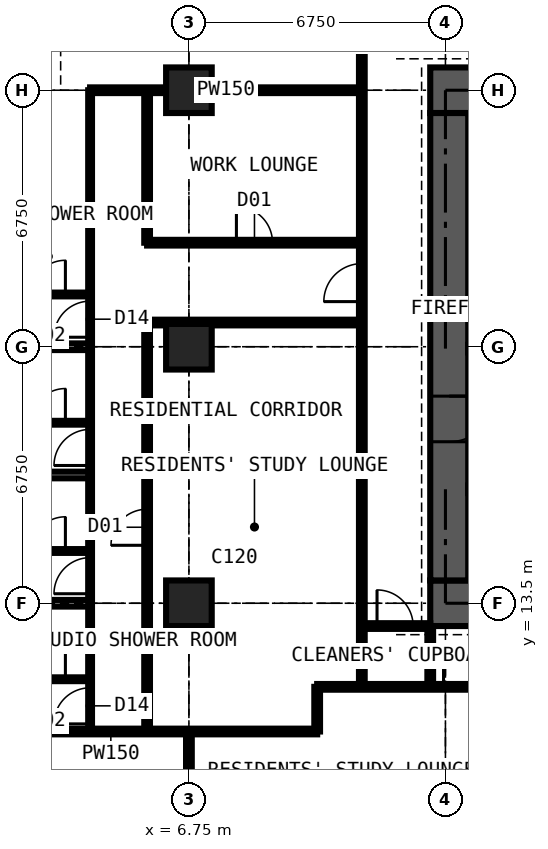
"""IFC4 building model, lengths in metres.
Left out: names, types, materials, properties, quantities, classifications, styles, units other than length and angle.
Written with IfcOpenShell. Run it as: python <this file> out.ifc"""

import sys

from ifc_helpers import new_model, si_unit, direction, frame, frame_2d, origin, origin_2d, place, context, subcontext, project, spatial, rectangle, extrude, element, fill, save


model = new_model("IFC4")
c1 = context("Model", 3, precision=1e-05, world=origin(), true_north=direction((0.0, 1.0)))
c2 = subcontext(c1, "Body", "Model", "MODEL_VIEW")
j1 = project(units=[si_unit("LENGTHUNIT", "METRE"), si_unit("PLANEANGLEUNIT", "RADIAN")], contexts=[c1])
p1 = place(None, origin())
s1 = spatial("IfcSite", under=j1, at=p1, CompositionType="ELEMENT")
p2 = place(p1, origin())
s2 = spatial("IfcBuilding", under=s1, at=p2, CompositionType="ELEMENT")
p3 = place(p2, frame((0.0, 0.0, 185.4)))
s3 = spatial("IfcBuildingStorey", under=s2, at=p3, CompositionType="ELEMENT", Elevation=185.4)
for number, where, z_axis, x_axis in (
    (1, (6.75, 13.5, 0.0), (0.0, 0.0, 1.0), (1.0, 0.0, 0.0)),
    (2, (6.75, 20.25, 0.0), (0.0, 0.0, 1.0), (1.0, 0.0, 0.0)),
    (3, (6.75, 27.0, 0.0), (0.0, 0.0, 1.0), (1.0, 0.0, 0.0)),
):
    element("IfcColumn", number, at=place(p3, frame(where, z_axis=z_axis, x_axis=x_axis)), inside=s3, PredefinedType="COLUMN", context=c2, shape_type="SweptSolid", body=[
        extrude(rectangle(XDim=1.2, YDim=1.2, at=origin_2d()), origin(), (0.0, 0.0, 1.0), 3.6),
    ])
p4 = place(p3, frame((13.1, 13.5, 0.0), z_axis=(0.0, 0.0, 1.0), x_axis=(1.0, 0.0, 0.0)))
e4 = element("IfcWall", 4, at=p4, inside=s3, PredefinedType="SHEAR", context=c2, shape_type="SweptSolid", body=[
    extrude(rectangle(XDim=14.3, YDim=1.2, at=frame_2d((7.15, 0.0))), origin(), (0.0, 0.0, 1.0), 3.6),
])
p5 = place(p3, frame((27.4, 27.0, 0.0), z_axis=(0.0, 0.0, 1.0), x_axis=(-1.0, 0.0, 0.0)))
e5 = element("IfcWall", 5, at=p5, inside=s3, PredefinedType="SHEAR", context=c2, shape_type="SweptSolid", body=[
    extrude(rectangle(XDim=14.3, YDim=1.2, at=frame_2d((7.15, 0.0))), origin(), (0.0, 0.0, 1.0), 3.6),
])
p6 = place(p5, frame((4.55, 0.0, 0.0)))
e6 = element("IfcOpeningElement", 6, at=p6, cuts=e5, PredefinedType="OPENING", context=c2, shape_type="SweptSolid", body=[
    extrude(rectangle(XDim=0.9, YDim=2.2, at=frame_2d((0.45, 1.1))), frame((0.0, 0.61, 0.0), z_axis=(0.0, -1.0, 0.0), x_axis=(1.0, 0.0, 0.0)), (0.0, 0.0, 1.0), 1.22),
])
p7 = place(p5, frame((7.525, 0.0, 0.0)))
e7 = element("IfcOpeningElement", 7, at=p7, cuts=e5, PredefinedType="OPENING", context=c2, shape_type="SweptSolid", body=[
    extrude(rectangle(XDim=1.0, YDim=2.2, at=frame_2d((0.5, 1.1))), frame((0.0, 0.61, 0.0), z_axis=(0.0, -1.0, 0.0), x_axis=(1.0, 0.0, 0.0)), (0.0, 0.0, 1.0), 1.22),
])
p8 = place(p3, frame((13.6, 26.4, 0.0), z_axis=(0.0, 0.0, 1.0), x_axis=(0.0, -1.0, 0.0)))
e8 = element("IfcWall", 8, at=p8, inside=s3, PredefinedType="SHEAR", context=c2, shape_type="SweptSolid", body=[
    extrude(rectangle(XDim=12.3, YDim=1.0, at=frame_2d((6.15, 0.0))), origin(), (0.0, 0.0, 1.0), 3.6),
])
p9 = place(p8, frame((7.45, 0.0, 0.0)))
e9 = element("IfcOpeningElement", 9, at=p9, cuts=e8, PredefinedType="OPENING", context=c2, shape_type="SweptSolid", body=[
    extrude(rectangle(XDim=1.2, YDim=2.2, at=frame_2d((0.6, 1.1))), frame((0.0, 0.51, 0.0), z_axis=(0.0, -1.0, 0.0), x_axis=(1.0, 0.0, 0.0)), (0.0, 0.0, 1.0), 1.02),
])
p10 = place(p3, frame((-0.734, 10.125, 0.0), z_axis=(0.0, 0.0, 1.0), x_axis=(1.0, 0.0, 0.0)))
e10 = element("IfcWall", 10, at=p10, inside=s3, PredefinedType="PARTITIONING", context=c2, shape_type="SweptSolid", body=[
    extrude(rectangle(XDim=10.859, YDim=0.15, at=frame_2d((5.429, 0.0))), origin(), (0.0, 0.0, 1.0), 3.375),
])
p11 = place(p3, frame((-0.734, 13.5, 0.0), z_axis=(0.0, 0.0, 1.0), x_axis=(1.0, 0.0, 0.0)))
e11 = element("IfcWall", 11, at=p11, inside=s3, PredefinedType="PARTITIONING", context=c2, shape_type="SweptSolid", body=[
    extrude(rectangle(XDim=4.884, YDim=0.175, at=frame_2d((2.442, 0.0))), origin(), (0.0, 0.0, 1.0), 2.877),
])
p12 = place(p3, frame((-0.734, 16.875, 0.0), z_axis=(0.0, 0.0, 1.0), x_axis=(1.0, 0.0, 0.0)))
e12 = element("IfcWall", 12, at=p12, inside=s3, PredefinedType="PARTITIONING", context=c2, shape_type="SweptSolid", body=[
    extrude(rectangle(XDim=4.884, YDim=0.175, at=frame_2d((2.442, 0.0))), origin(), (0.0, 0.0, 1.0), 3.375),
])
p13 = place(p3, frame((-0.734, 20.25, 0.0), z_axis=(0.0, 0.0, 1.0), x_axis=(1.0, 0.0, 0.0)))
e13 = element("IfcWall", 13, at=p13, inside=s3, PredefinedType="PARTITIONING", context=c2, shape_type="SweptSolid", body=[
    extrude(rectangle(XDim=4.884, YDim=0.175, at=frame_2d((2.442, 0.0))), origin(), (0.0, 0.0, 1.0), 2.877),
])
p14 = place(p3, frame((-0.734, 23.625, 0.0), z_axis=(0.0, 0.0, 1.0), x_axis=(1.0, 0.0, 0.0)))
e14 = element("IfcWall", 14, at=p14, inside=s3, PredefinedType="PARTITIONING", context=c2, shape_type="SweptSolid", body=[
    extrude(rectangle(XDim=4.884, YDim=0.15, at=frame_2d((2.442, 0.0))), origin(), (0.0, 0.0, 1.0), 3.375),
])
p15 = place(p3, frame((1.95, 11.5, 0.0), z_axis=(0.0, 0.0, 1.0), x_axis=(1.0, 0.0, 0.0)))
e15 = element("IfcWall", 15, at=p15, inside=s3, PredefinedType="PARTITIONING", context=c2, shape_type="SweptSolid", body=[
    extrude(rectangle(XDim=2.2, YDim=0.1, at=frame_2d((1.1, 0.0))), origin(), (0.0, 0.0, 1.0), 3.375),
])
p16 = place(p15, frame((0.65, 0.0, 0.0)))
e16 = element("IfcOpeningElement", 16, at=p16, cuts=e15, PredefinedType="OPENING", context=c2, shape_type="SweptSolid", body=[
    extrude(rectangle(XDim=0.9, YDim=2.2, at=frame_2d((0.45, 1.1))), frame((0.0, 0.06, 0.0), z_axis=(0.0, -1.0, 0.0), x_axis=(1.0, 0.0, 0.0)), (0.0, 0.0, 1.0), 0.12),
])
p17 = place(p3, frame((1.95, 14.875, 0.0), z_axis=(0.0, 0.0, 1.0), x_axis=(1.0, 0.0, 0.0)))
e17 = element("IfcWall", 17, at=p17, inside=s3, PredefinedType="PARTITIONING", context=c2, shape_type="SweptSolid", body=[
    extrude(rectangle(XDim=2.2, YDim=0.1, at=frame_2d((1.1, 0.0))), origin(), (0.0, 0.0, 1.0), 3.375),
])
p18 = place(p17, frame((0.65, 0.0, 0.0)))
e18 = element("IfcOpeningElement", 18, at=p18, cuts=e17, PredefinedType="OPENING", context=c2, shape_type="SweptSolid", body=[
    extrude(rectangle(XDim=0.9, YDim=2.2, at=frame_2d((0.45, 1.1))), frame((0.0, 0.06, 0.0), z_axis=(0.0, -1.0, 0.0), x_axis=(1.0, 0.0, 0.0)), (0.0, 0.0, 1.0), 0.12),
])
p19 = place(p3, frame((1.95, 18.25, 0.0), z_axis=(0.0, 0.0, 1.0), x_axis=(1.0, 0.0, 0.0)))
e19 = element("IfcWall", 19, at=p19, inside=s3, PredefinedType="PARTITIONING", context=c2, shape_type="SweptSolid", body=[
    extrude(rectangle(XDim=2.2, YDim=0.1, at=frame_2d((1.1, 0.0))), origin(), (0.0, 0.0, 1.0), 3.375),
])
p20 = place(p19, frame((0.65, 0.0, 0.0)))
e20 = element("IfcOpeningElement", 20, at=p20, cuts=e19, PredefinedType="OPENING", context=c2, shape_type="SweptSolid", body=[
    extrude(rectangle(XDim=0.9, YDim=2.2, at=frame_2d((0.45, 1.1))), frame((0.0, 0.06, 0.0), z_axis=(0.0, -1.0, 0.0), x_axis=(1.0, 0.0, 0.0)), (0.0, 0.0, 1.0), 0.12),
])
p21 = place(p3, frame((1.95, 21.625, 0.0), z_axis=(0.0, 0.0, 1.0), x_axis=(1.0, 0.0, 0.0)))
e21 = element("IfcWall", 21, at=p21, inside=s3, PredefinedType="PARTITIONING", context=c2, shape_type="SweptSolid", body=[
    extrude(rectangle(XDim=2.2, YDim=0.1, at=frame_2d((1.1, 0.0))), origin(), (0.0, 0.0, 1.0), 3.375),
])
p22 = place(p21, frame((0.65, 0.0, 0.0)))
e22 = element("IfcOpeningElement", 22, at=p22, cuts=e21, PredefinedType="OPENING", context=c2, shape_type="SweptSolid", body=[
    extrude(rectangle(XDim=0.9, YDim=2.2, at=frame_2d((0.45, 1.1))), frame((0.0, 0.06, 0.0), z_axis=(0.0, -1.0, 0.0), x_axis=(1.0, 0.0, 0.0)), (0.0, 0.0, 1.0), 0.12),
])
p23 = place(p3, frame((4.15, 10.125, 0.0), z_axis=(0.0, 0.0, 1.0), x_axis=(0.0, 1.0, 0.0)))
e23 = element("IfcWall", 23, at=p23, inside=s3, PredefinedType="PARTITIONING", context=c2, shape_type="SweptSolid", body=[
    extrude(rectangle(XDim=16.875, YDim=0.1, at=frame_2d((8.438, 0.0))), origin(), (0.0, 0.0, 1.0), 3.375),
])
p24 = place(p23, frame((0.2, 0.0, 0.0)))
e24 = element("IfcOpeningElement", 24, at=p24, cuts=e23, PredefinedType="OPENING", context=c2, shape_type="SweptSolid", body=[
    extrude(rectangle(XDim=0.95, YDim=2.2, at=frame_2d((0.475, 1.1))), frame((0.0, 0.06, 0.0), z_axis=(0.0, -1.0, 0.0), x_axis=(1.0, 0.0, 0.0)), (0.0, 0.0, 1.0), 0.12),
])
p25 = place(p23, frame((3.625, 0.0, 0.0)))
e25 = element("IfcOpeningElement", 25, at=p25, cuts=e23, PredefinedType="OPENING", context=c2, shape_type="SweptSolid", body=[
    extrude(rectangle(XDim=0.95, YDim=2.2, at=frame_2d((0.475, 1.1))), frame((0.0, 0.06, 0.0), z_axis=(0.0, -1.0, 0.0), x_axis=(1.0, 0.0, 0.0)), (0.0, 0.0, 1.0), 0.12),
])
p26 = place(p23, frame((7.0, 0.0, 0.0)))
e26 = element("IfcOpeningElement", 26, at=p26, cuts=e23, PredefinedType="OPENING", context=c2, shape_type="SweptSolid", body=[
    extrude(rectangle(XDim=0.95, YDim=2.2, at=frame_2d((0.475, 1.1))), frame((0.0, 0.06, 0.0), z_axis=(0.0, -1.0, 0.0), x_axis=(1.0, 0.0, 0.0)), (0.0, 0.0, 1.0), 0.12),
])
p27 = place(p23, frame((10.375, 0.0, 0.0)))
e27 = element("IfcOpeningElement", 27, at=p27, cuts=e23, PredefinedType="OPENING", context=c2, shape_type="SweptSolid", body=[
    extrude(rectangle(XDim=0.95, YDim=2.2, at=frame_2d((0.475, 1.1))), frame((0.0, 0.06, 0.0), z_axis=(0.0, -1.0, 0.0), x_axis=(1.0, 0.0, 0.0)), (0.0, 0.0, 1.0), 0.12),
])
p28 = place(p3, frame((4.15, 27.0, 0.0), z_axis=(0.0, 0.0, 1.0), x_axis=(1.0, 0.0, 0.0)))
e28 = element("IfcWall", 28, at=p28, inside=s3, PredefinedType="PARTITIONING", context=c2, shape_type="SweptSolid", body=[
    extrude(rectangle(XDim=7.15, YDim=0.15, at=frame_2d((3.575, 0.0))), origin(), (0.0, 0.0, 1.0), 2.806),
])
p29 = place(p3, frame((5.65, 10.125, 0.0), z_axis=(0.0, 0.0, 1.0), x_axis=(0.0, 1.0, 0.0)))
e29 = element("IfcWall", 29, at=p29, inside=s3, PredefinedType="PARTITIONING", context=c2, shape_type="SweptSolid", body=[
    extrude(rectangle(XDim=10.762, YDim=0.15, at=frame_2d((5.381, 0.0))), origin(), (0.0, 0.0, 1.0), 3.375),
])
p30 = place(p29, frame((4.9, 0.0, 0.0)))
e30 = element("IfcOpeningElement", 30, at=p30, cuts=e29, PredefinedType="OPENING", context=c2, shape_type="SweptSolid", body=[
    extrude(rectangle(XDim=0.95, YDim=2.2, at=frame_2d((0.475, 1.1))), frame((0.0, 0.085, 0.0), z_axis=(0.0, -1.0, 0.0), x_axis=(1.0, 0.0, 0.0)), (0.0, 0.0, 1.0), 0.17),
])
p31 = place(p3, frame((5.65, 20.887, 0.0), z_axis=(0.0, 0.0, 1.0), x_axis=(1.0, 0.0, 0.0)))
e31 = element("IfcWall", 31, at=p31, inside=s3, PredefinedType="PARTITIONING", context=c2, shape_type="SweptSolid", body=[
    extrude(rectangle(XDim=5.65, YDim=0.15, at=frame_2d((2.825, 0.0))), origin(), (0.0, 0.0, 1.0), 3.375),
])
p32 = place(p3, frame((5.65, 22.988, 0.0), z_axis=(0.0, 0.0, 1.0), x_axis=(0.0, 1.0, 0.0)))
e32 = element("IfcWall", 32, at=p32, inside=s3, PredefinedType="PARTITIONING", context=c2, shape_type="SweptSolid", body=[
    extrude(rectangle(XDim=4.012, YDim=0.15, at=frame_2d((2.006, 0.0))), origin(), (0.0, 0.0, 1.0), 3.375),
])
p33 = place(p3, frame((5.65, 22.988, 0.0), z_axis=(0.0, 0.0, 1.0), x_axis=(1.0, 0.0, 0.0)))
e33 = element("IfcWall", 33, at=p33, inside=s3, PredefinedType="PARTITIONING", context=c2, shape_type="SweptSolid", body=[
    extrude(rectangle(XDim=5.65, YDim=0.15, at=frame_2d((2.825, 0.0))), origin(), (0.0, 0.0, 1.0), 3.375),
])
p34 = place(p33, frame((2.35, 0.0, 0.0)))
e34 = element("IfcOpeningElement", 34, at=p34, cuts=e33, PredefinedType="OPENING", context=c2, shape_type="SweptSolid", body=[
    extrude(rectangle(XDim=0.95, YDim=2.2, at=frame_2d((0.475, 1.1))), frame((0.0, 0.085, 0.0), z_axis=(0.0, -1.0, 0.0), x_axis=(1.0, 0.0, 0.0)), (0.0, 0.0, 1.0), 0.17),
])
p35 = place(p3, frame((6.75, 4.15, 0.0), z_axis=(0.0, 0.0, 1.0), x_axis=(0.0, 1.0, 0.0)))
e35 = element("IfcWall", 35, at=p35, inside=s3, PredefinedType="PARTITIONING", context=c2, shape_type="SweptSolid", body=[
    extrude(rectangle(XDim=5.975, YDim=0.15, at=frame_2d((2.988, 0.0))), origin(), (0.0, 0.0, 1.0), 2.877),
])
p36 = place(p3, frame((10.125, 10.125, 0.0), z_axis=(0.0, 0.0, 1.0), x_axis=(0.0, 1.0, 0.0)))
e36 = element("IfcWall", 36, at=p36, inside=s3, PredefinedType="PARTITIONING", context=c2, shape_type="SweptSolid", body=[
    extrude(rectangle(XDim=1.175, YDim=0.15, at=frame_2d((0.587, 0.0))), origin(), (0.0, 0.0, 1.0), 3.375),
])
p37 = place(p3, frame((10.125, 11.3, 0.0), z_axis=(0.0, 0.0, 1.0), x_axis=(1.0, 0.0, 0.0)))
e37 = element("IfcWall", 37, at=p37, inside=s3, PredefinedType="PARTITIONING", context=c2, shape_type="SweptSolid", body=[
    extrude(rectangle(XDim=20.25, YDim=0.15, at=frame_2d((10.125, 0.0))), origin(), (0.0, 0.0, 1.0), 3.375),
])
p38 = place(p37, frame((5.2, 0.0, 0.0)))
e38 = element("IfcOpeningElement", 38, at=p38, cuts=e37, PredefinedType="OPENING", context=c2, shape_type="SweptSolid", body=[
    extrude(rectangle(XDim=1.0, YDim=2.2, at=frame_2d((0.5, 1.1))), frame((0.0, 0.085, 0.0), z_axis=(0.0, -1.0, 0.0), x_axis=(1.0, 0.0, 0.0)), (0.0, 0.0, 1.0), 0.17),
])
p39 = place(p37, frame((11.312, 0.0, 0.0)))
e39 = element("IfcOpeningElement", 39, at=p39, cuts=e37, PredefinedType="OPENING", context=c2, shape_type="SweptSolid", body=[
    extrude(rectangle(XDim=1.0, YDim=2.2, at=frame_2d((0.5, 1.1))), frame((0.0, 0.085, 0.0), z_axis=(0.0, -1.0, 0.0), x_axis=(1.0, 0.0, 0.0)), (0.0, 0.0, 1.0), 0.17),
])
p40 = place(p37, frame((3.325, 0.0, 0.0)))
e40 = element("IfcOpeningElement", 40, at=p40, cuts=e37, PredefinedType="OPENING", context=c2, shape_type="SweptSolid", body=[
    extrude(rectangle(XDim=0.95, YDim=2.2, at=frame_2d((0.475, 1.1))), frame((0.0, 0.085, 0.0), z_axis=(0.0, -1.0, 0.0), x_axis=(1.0, 0.0, 0.0)), (0.0, 0.0, 1.0), 0.17),
])
p41 = place(p3, frame((11.3, 11.3, 0.0), z_axis=(0.0, 0.0, 1.0), x_axis=(0.0, 1.0, 0.0)))
e41 = element("IfcWall", 41, at=p41, inside=s3, PredefinedType="PARTITIONING", context=c2, shape_type="SweptSolid", body=[
    extrude(rectangle(XDim=19.3, YDim=0.15, at=frame_2d((9.65, 0.0))), origin(), (0.0, 0.0, 1.0), 3.375),
])
p42 = place(p41, frame((18.1, 0.0, 0.0)))
e42 = element("IfcOpeningElement", 42, at=p42, cuts=e41, PredefinedType="OPENING", context=c2, shape_type="SweptSolid", body=[
    extrude(rectangle(XDim=1.0, YDim=2.2, at=frame_2d((0.5, 1.1))), frame((0.0, 0.085, 0.0), z_axis=(0.0, -1.0, 0.0), x_axis=(1.0, 0.0, 0.0)), (0.0, 0.0, 1.0), 0.17),
])
p43 = place(p41, frame((10.137, 0.0, 0.0)))
e43 = element("IfcOpeningElement", 43, at=p43, cuts=e41, PredefinedType="OPENING", context=c2, shape_type="SweptSolid", body=[
    extrude(rectangle(XDim=1.0, YDim=2.2, at=frame_2d((0.5, 1.1))), frame((0.0, 0.085, 0.0), z_axis=(0.0, -1.0, 0.0), x_axis=(1.0, 0.0, 0.0)), (0.0, 0.0, 1.0), 0.17),
])
p44 = place(p3, frame((11.3, 12.9, 0.0), z_axis=(0.0, 0.0, 1.0), x_axis=(1.0, 0.0, 0.0)))
e44 = element("IfcWall", 44, at=p44, inside=s3, PredefinedType="PARTITIONING", context=c2, shape_type="SweptSolid", body=[
    extrude(rectangle(XDim=1.8, YDim=0.15, at=frame_2d((0.9, 0.0))), origin(), (0.0, 0.0, 1.0), 2.806),
])
p45 = place(p44, frame((0.4, 0.0, 0.0)))
e45 = element("IfcOpeningElement", 45, at=p45, cuts=e44, PredefinedType="OPENING", context=c2, shape_type="SweptSolid", body=[
    extrude(rectangle(XDim=0.95, YDim=2.2, at=frame_2d((0.475, 1.1))), frame((0.0, 0.085, 0.0), z_axis=(0.0, -1.0, 0.0), x_axis=(1.0, 0.0, 0.0)), (0.0, 0.0, 1.0), 0.17),
])
p46 = place(p3, frame((13.1, 11.3, 0.0), z_axis=(0.0, 0.0, 1.0), x_axis=(0.0, 1.0, 0.0)))
e46 = element("IfcWall", 46, at=p46, inside=s3, PredefinedType="PARTITIONING", context=c2, shape_type="SweptSolid", body=[
    extrude(rectangle(XDim=1.6, YDim=0.15, at=frame_2d((0.8, 0.0))), origin(), (0.0, 0.0, 1.0), 3.375),
])
p47 = place(p9, origin())
e47 = element("IfcDoor", 47, at=p47, inside=s3, OperationType="DOUBLE_DOOR_SINGLE_SWING", PredefinedType="DOOR", context=c2, shape_type="SweptSolid", body=[
    extrude(rectangle(XDim=1.2, YDim=2.2, at=frame_2d((0.6, 1.1))), frame((0.0, 0.025, 0.0), z_axis=(0.0, -1.0, 0.0), x_axis=(1.0, 0.0, 0.0)), (0.0, 0.0, 1.0), 0.05),
])
fill(e9, e47)
p48 = place(p45, origin())
e48 = element("IfcDoor", 48, at=p48, inside=s3, OperationType="SINGLE_SWING_LEFT", PredefinedType="DOOR", context=c2, shape_type="SweptSolid", body=[
    extrude(rectangle(XDim=0.95, YDim=2.2, at=frame_2d((0.475, 1.1))), frame((0.0, 0.025, 0.0), z_axis=(0.0, -1.0, 0.0), x_axis=(1.0, 0.0, 0.0)), (0.0, 0.0, 1.0), 0.05),
])
fill(e45, e48)
p49 = place(p40, origin())
e49 = element("IfcDoor", 49, at=p49, inside=s3, OperationType="SINGLE_SWING_LEFT", PredefinedType="DOOR", context=c2, shape_type="SweptSolid", body=[
    extrude(rectangle(XDim=0.95, YDim=2.2, at=frame_2d((0.475, 1.1))), frame((0.0, 0.025, 0.0), z_axis=(0.0, -1.0, 0.0), x_axis=(1.0, 0.0, 0.0)), (0.0, 0.0, 1.0), 0.05),
])
fill(e40, e49)
p50 = place(p24, origin())
e50 = element("IfcDoor", 50, at=p50, inside=s3, OperationType="SINGLE_SWING_LEFT", PredefinedType="DOOR", context=c2, shape_type="SweptSolid", body=[
    extrude(rectangle(XDim=0.95, YDim=2.2, at=frame_2d((0.475, 1.1))), frame((0.0, 0.025, 0.0), z_axis=(0.0, -1.0, 0.0), x_axis=(1.0, 0.0, 0.0)), (0.0, 0.0, 1.0), 0.05),
])
fill(e24, e50)
p51 = place(p16, origin())
e51 = element("IfcDoor", 51, at=p51, inside=s3, OperationType="SINGLE_SWING_RIGHT", PredefinedType="DOOR", context=c2, shape_type="SweptSolid", body=[
    extrude(rectangle(XDim=0.9, YDim=2.2, at=frame_2d((0.45, 1.1))), frame((0.0, 0.025, 0.0), z_axis=(0.0, -1.0, 0.0), x_axis=(1.0, 0.0, 0.0)), (0.0, 0.0, 1.0), 0.05),
])
fill(e16, e51)
p52 = place(p25, origin())
e52 = element("IfcDoor", 52, at=p52, inside=s3, OperationType="SINGLE_SWING_LEFT", PredefinedType="DOOR", context=c2, shape_type="SweptSolid", body=[
    extrude(rectangle(XDim=0.95, YDim=2.2, at=frame_2d((0.475, 1.1))), frame((0.0, 0.025, 0.0), z_axis=(0.0, -1.0, 0.0), x_axis=(1.0, 0.0, 0.0)), (0.0, 0.0, 1.0), 0.05),
])
fill(e25, e52)
p53 = place(p18, origin())
e53 = element("IfcDoor", 53, at=p53, inside=s3, OperationType="SINGLE_SWING_RIGHT", PredefinedType="DOOR", context=c2, shape_type="SweptSolid", body=[
    extrude(rectangle(XDim=0.9, YDim=2.2, at=frame_2d((0.45, 1.1))), frame((0.0, 0.025, 0.0), z_axis=(0.0, -1.0, 0.0), x_axis=(1.0, 0.0, 0.0)), (0.0, 0.0, 1.0), 0.05),
])
fill(e18, e53)
p54 = place(p26, origin())
e54 = element("IfcDoor", 54, at=p54, inside=s3, OperationType="SINGLE_SWING_LEFT", PredefinedType="DOOR", context=c2, shape_type="SweptSolid", body=[
    extrude(rectangle(XDim=0.95, YDim=2.2, at=frame_2d((0.475, 1.1))), frame((0.0, 0.025, 0.0), z_axis=(0.0, -1.0, 0.0), x_axis=(1.0, 0.0, 0.0)), (0.0, 0.0, 1.0), 0.05),
])
fill(e26, e54)
p55 = place(p20, origin())
e55 = element("IfcDoor", 55, at=p55, inside=s3, OperationType="SINGLE_SWING_RIGHT", PredefinedType="DOOR", context=c2, shape_type="SweptSolid", body=[
    extrude(rectangle(XDim=0.9, YDim=2.2, at=frame_2d((0.45, 1.1))), frame((0.0, 0.025, 0.0), z_axis=(0.0, -1.0, 0.0), x_axis=(1.0, 0.0, 0.0)), (0.0, 0.0, 1.0), 0.05),
])
fill(e20, e55)
p56 = place(p27, origin())
e56 = element("IfcDoor", 56, at=p56, inside=s3, OperationType="SINGLE_SWING_LEFT", PredefinedType="DOOR", context=c2, shape_type="SweptSolid", body=[
    extrude(rectangle(XDim=0.95, YDim=2.2, at=frame_2d((0.475, 1.1))), frame((0.0, 0.025, 0.0), z_axis=(0.0, -1.0, 0.0), x_axis=(1.0, 0.0, 0.0)), (0.0, 0.0, 1.0), 0.05),
])
fill(e27, e56)
p57 = place(p22, origin())
e57 = element("IfcDoor", 57, at=p57, inside=s3, OperationType="SINGLE_SWING_RIGHT", PredefinedType="DOOR", context=c2, shape_type="SweptSolid", body=[
    extrude(rectangle(XDim=0.9, YDim=2.2, at=frame_2d((0.45, 1.1))), frame((0.0, 0.025, 0.0), z_axis=(0.0, -1.0, 0.0), x_axis=(1.0, 0.0, 0.0)), (0.0, 0.0, 1.0), 0.05),
])
fill(e22, e57)
p58 = place(p43, origin())
e58 = element("IfcDoor", 58, at=p58, inside=s3, OperationType="SINGLE_SWING_LEFT", PredefinedType="DOOR", context=c2, shape_type="SweptSolid", body=[
    extrude(rectangle(XDim=1.0, YDim=2.2, at=frame_2d((0.5, 1.1))), frame((0.0, 0.025, 0.0), z_axis=(0.0, -1.0, 0.0), x_axis=(1.0, 0.0, 0.0)), (0.0, 0.0, 1.0), 0.05),
])
fill(e43, e58)
p59 = place(p30, origin())
e59 = element("IfcDoor", 59, at=p59, inside=s3, OperationType="SINGLE_SWING_LEFT", PredefinedType="DOOR", context=c2, shape_type="SweptSolid", body=[
    extrude(rectangle(XDim=0.95, YDim=2.2, at=frame_2d((0.475, 1.1))), frame((0.0, 0.025, 0.0), z_axis=(0.0, -1.0, 0.0), x_axis=(1.0, 0.0, 0.0)), (0.0, 0.0, 1.0), 0.05),
])
fill(e30, e59)
p60 = place(p34, origin())
e60 = element("IfcDoor", 60, at=p60, inside=s3, OperationType="SINGLE_SWING_LEFT", PredefinedType="DOOR", context=c2, shape_type="SweptSolid", body=[
    extrude(rectangle(XDim=0.95, YDim=2.2, at=frame_2d((0.475, 1.1))), frame((0.0, 0.025, 0.0), z_axis=(0.0, -1.0, 0.0), x_axis=(1.0, 0.0, 0.0)), (0.0, 0.0, 1.0), 0.05),
])
fill(e34, e60)
save(model, sys.argv[1])
